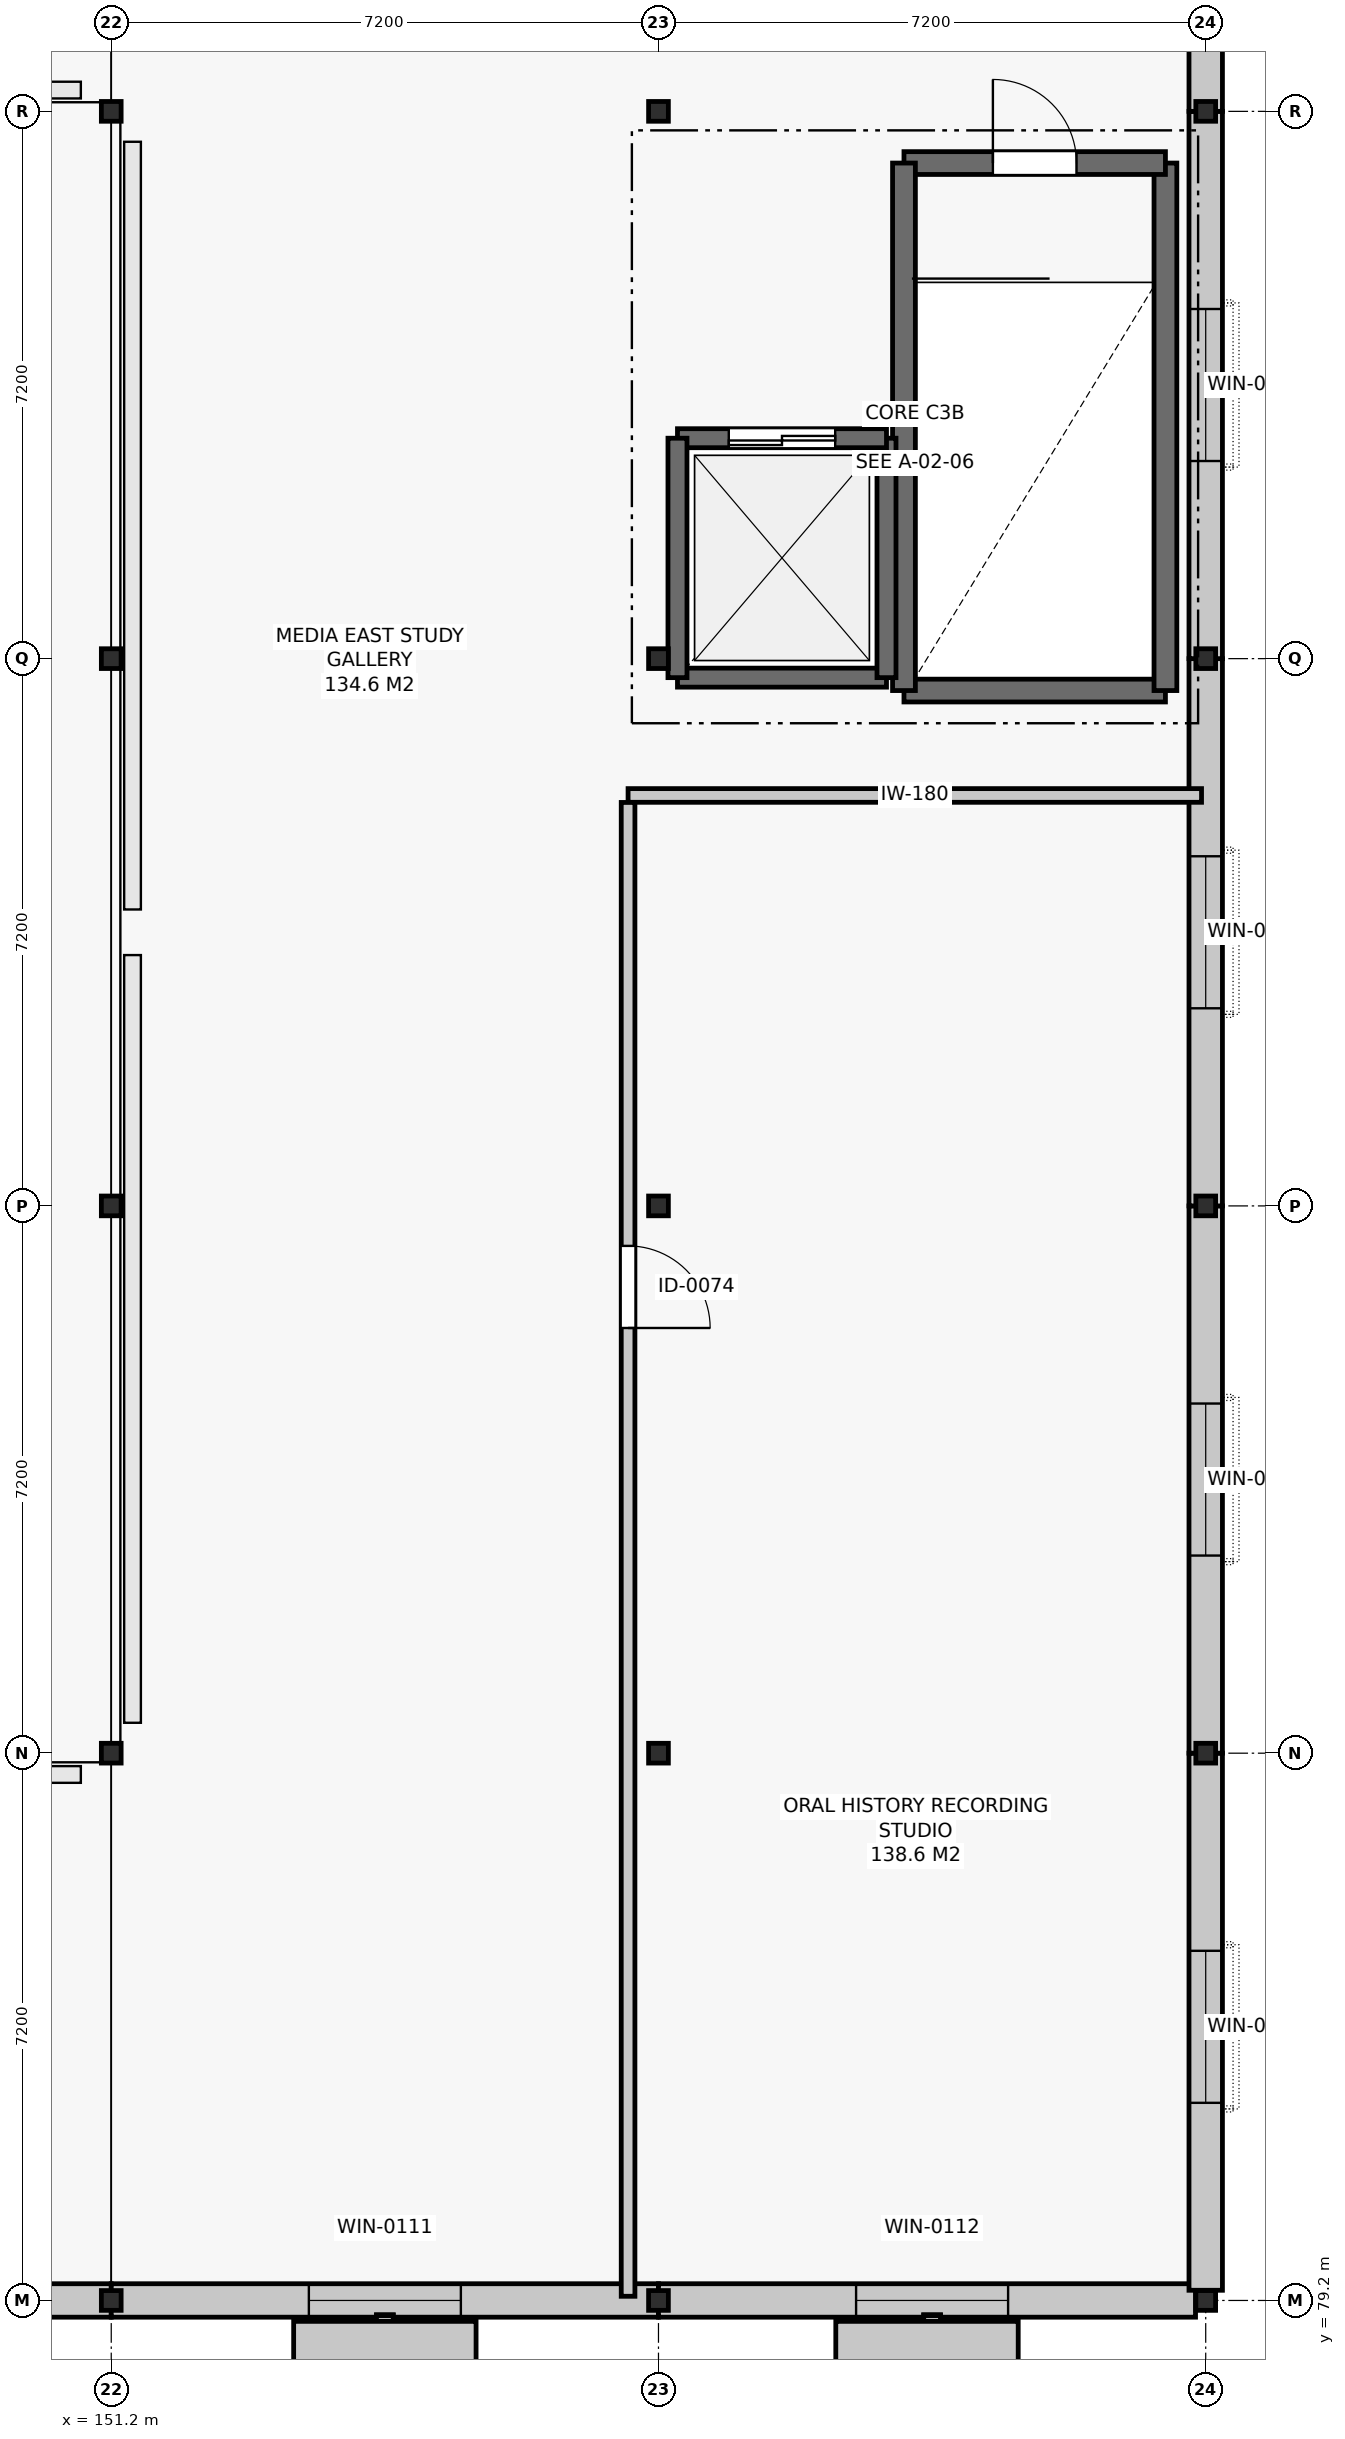
"""IFC4 building model, lengths in metres.
Left out: names, types, materials, properties, quantities, classifications, styles, units other than length and angle.
Written with IfcOpenShell. Run it as: python <this file> out.ifc"""

import sys

from ifc_helpers import new_model, si_unit, direction, frame, frame_2d, origin, origin_2d, place, context, subcontext, project, spatial, rectangle, i_section, extrude, element, fill, save


model = new_model("IFC4")
c1 = context("Model", 3, precision=1e-05, world=origin(), true_north=direction((0.0, 1.0)))
c2 = subcontext(c1, "Body", "Model", "MODEL_VIEW")
j1 = project(units=[si_unit("LENGTHUNIT", "METRE"), si_unit("PLANEANGLEUNIT", "RADIAN")], contexts=[c1])
p1 = place(None, origin())
s1 = spatial("IfcSite", under=j1, at=p1, CompositionType="ELEMENT")
p2 = place(p1, origin())
s2 = spatial("IfcBuilding", under=s1, at=p2, CompositionType="ELEMENT")
p3 = place(p2, frame((0.0, 0.0, 10.2)))
s3 = spatial("IfcBuildingStorey", under=s2, at=p3, CompositionType="ELEMENT", Elevation=10.2)
for number, where, z_axis, x_axis in (
    (1, (151.2, 79.2, 0.0), (0.0, 0.0, 1.0), (1.0, 0.0, 0.0)),
    (2, (151.2, 86.4, 0.0), (0.0, 0.0, 1.0), (1.0, 0.0, 0.0)),
    (3, (151.2, 93.6, 0.0), (0.0, 0.0, 1.0), (1.0, 0.0, 0.0)),
    (4, (151.2, 100.8, 0.0), (0.0, 0.0, 1.0), (1.0, 0.0, 0.0)),
    (5, (151.2, 108.0, 0.0), (0.0, 0.0, 1.0), (1.0, 0.0, 0.0)),
    (6, (158.4, 79.2, 0.0), (0.0, 0.0, 1.0), (1.0, 0.0, 0.0)),
    (7, (158.4, 86.4, 0.0), (0.0, 0.0, 1.0), (1.0, 0.0, 0.0)),
    (8, (158.4, 93.6, 0.0), (0.0, 0.0, 1.0), (1.0, 0.0, 0.0)),
    (9, (158.4, 100.8, 0.0), (0.0, 0.0, 1.0), (1.0, 0.0, 0.0)),
    (10, (158.4, 108.0, 0.0), (0.0, 0.0, 1.0), (1.0, 0.0, 0.0)),
    (11, (165.6, 79.2, 0.0), (0.0, 0.0, 1.0), (1.0, 0.0, 0.0)),
    (12, (165.6, 86.4, 0.0), (0.0, 0.0, 1.0), (1.0, 0.0, 0.0)),
    (13, (165.6, 93.6, 0.0), (0.0, 0.0, 1.0), (1.0, 0.0, 0.0)),
    (14, (165.6, 100.8, 0.0), (0.0, 0.0, 1.0), (1.0, 0.0, 0.0)),
    (15, (165.6, 108.0, 0.0), (0.0, 0.0, 1.0), (1.0, 0.0, 0.0)),
):
    element("IfcColumn", number, at=place(p3, frame(where, z_axis=z_axis, x_axis=x_axis)), inside=s3, PredefinedType="COLUMN", context=c2, shape_type="SweptSolid", body=[
        extrude(i_section(OverallWidth=0.26, OverallDepth=0.26, WebThickness=0.01, FlangeThickness=0.018, FilletRadius=0.024, at=origin_2d()), origin(), (0.0, 0.0, 1.0), 4.2),
    ])
p4 = place(p3, frame((144.0, 79.2, 0.0), z_axis=(0.0, 0.0, 1.0), x_axis=(1.0, 0.0, 0.0)))
e16 = element("IfcWall", 16, at=p4, inside=s3, PredefinedType="SOLIDWALL", context=c2, shape_type="SweptSolid", body=[
    extrude(rectangle(XDim=7.2, YDim=0.44, at=frame_2d((3.6, 0.0))), origin(), (0.0, 0.0, 1.0), 3.24),
])
p5 = place(p4, frame((2.6, 0.0, 1.35)))
e17 = element("IfcOpeningElement", 17, at=p5, cuts=e16, PredefinedType="OPENING", context=c2, shape_type="SweptSolid", body=[
    extrude(rectangle(XDim=2.0, YDim=1.5, at=frame_2d((1.0, 0.75))), frame((0.0, 0.232, 0.0), z_axis=(0.0, -1.0, 0.0), x_axis=(1.0, 0.0, 0.0)), (0.0, 0.0, 1.0), 0.464),
])
p6 = place(p3, frame((151.2, 79.2, 0.0), z_axis=(0.0, 0.0, 1.0), x_axis=(1.0, 0.0, 0.0)))
e18 = element("IfcWall", 18, at=p6, inside=s3, PredefinedType="SOLIDWALL", context=c2, shape_type="SweptSolid", body=[
    extrude(rectangle(XDim=7.2, YDim=0.44, at=frame_2d((3.6, 0.0))), origin(), (0.0, 0.0, 1.0), 3.24),
])
p7 = place(p6, frame((2.6, 0.0, 1.35)))
e19 = element("IfcOpeningElement", 19, at=p7, cuts=e18, PredefinedType="OPENING", context=c2, shape_type="SweptSolid", body=[
    extrude(rectangle(XDim=2.0, YDim=1.5, at=frame_2d((1.0, 0.75))), frame((0.0, 0.232, 0.0), z_axis=(0.0, -1.0, 0.0), x_axis=(1.0, 0.0, 0.0)), (0.0, 0.0, 1.0), 0.464),
])
p8 = place(p3, frame((158.4, 79.2, 0.0), z_axis=(0.0, 0.0, 1.0), x_axis=(1.0, 0.0, 0.0)))
e20 = element("IfcWall", 20, at=p8, inside=s3, PredefinedType="SOLIDWALL", context=c2, shape_type="SweptSolid", body=[
    extrude(rectangle(XDim=7.066, YDim=0.44, at=frame_2d((3.533, 0.0))), origin(), (0.0, 0.0, 1.0), 3.24),
])
p9 = place(p8, frame((2.6, 0.0, 1.35)))
e21 = element("IfcOpeningElement", 21, at=p9, cuts=e20, PredefinedType="OPENING", context=c2, shape_type="SweptSolid", body=[
    extrude(rectangle(XDim=2.0, YDim=1.5, at=frame_2d((1.0, 0.75))), frame((0.0, 0.232, 0.0), z_axis=(0.0, -1.0, 0.0), x_axis=(1.0, 0.0, 0.0)), (0.0, 0.0, 1.0), 0.464),
])
p10 = place(p3, frame((165.6, 79.334, 0.0), z_axis=(0.0, 0.0, 1.0), x_axis=(0.0, 1.0, 0.0)))
e22 = element("IfcWall", 22, at=p10, inside=s3, PredefinedType="SOLIDWALL", context=c2, shape_type="SweptSolid", body=[
    extrude(rectangle(XDim=7.066, YDim=0.44, at=frame_2d((3.533, 0.0))), origin(), (0.0, 0.0, 1.0), 3.24),
])
p11 = place(p10, frame((2.466, 0.0, 1.35)))
e23 = element("IfcOpeningElement", 23, at=p11, cuts=e22, PredefinedType="OPENING", context=c2, shape_type="SweptSolid", body=[
    extrude(rectangle(XDim=2.0, YDim=1.5, at=frame_2d((1.0, 0.75))), frame((0.0, 0.232, 0.0), z_axis=(0.0, -1.0, 0.0), x_axis=(1.0, 0.0, 0.0)), (0.0, 0.0, 1.0), 0.464),
])
p12 = place(p3, frame((165.6, 86.4, 0.0), z_axis=(0.0, 0.0, 1.0), x_axis=(0.0, 1.0, 0.0)))
e24 = element("IfcWall", 24, at=p12, inside=s3, PredefinedType="SOLIDWALL", context=c2, shape_type="SweptSolid", body=[
    extrude(rectangle(XDim=7.2, YDim=0.44, at=frame_2d((3.6, 0.0))), origin(), (0.0, 0.0, 1.0), 3.24),
])
p13 = place(p12, frame((2.6, 0.0, 1.35)))
e25 = element("IfcOpeningElement", 25, at=p13, cuts=e24, PredefinedType="OPENING", context=c2, shape_type="SweptSolid", body=[
    extrude(rectangle(XDim=2.0, YDim=1.5, at=frame_2d((1.0, 0.75))), frame((0.0, 0.232, 0.0), z_axis=(0.0, -1.0, 0.0), x_axis=(1.0, 0.0, 0.0)), (0.0, 0.0, 1.0), 0.464),
])
p14 = place(p3, frame((165.6, 93.6, 0.0), z_axis=(0.0, 0.0, 1.0), x_axis=(0.0, 1.0, 0.0)))
e26 = element("IfcWall", 26, at=p14, inside=s3, PredefinedType="SOLIDWALL", context=c2, shape_type="SweptSolid", body=[
    extrude(rectangle(XDim=7.2, YDim=0.44, at=frame_2d((3.6, 0.0))), origin(), (0.0, 0.0, 1.0), 3.24),
])
p15 = place(p14, frame((2.6, 0.0, 1.35)))
e27 = element("IfcOpeningElement", 27, at=p15, cuts=e26, PredefinedType="OPENING", context=c2, shape_type="SweptSolid", body=[
    extrude(rectangle(XDim=2.0, YDim=1.5, at=frame_2d((1.0, 0.75))), frame((0.0, 0.232, 0.0), z_axis=(0.0, -1.0, 0.0), x_axis=(1.0, 0.0, 0.0)), (0.0, 0.0, 1.0), 0.464),
])
p16 = place(p3, frame((165.6, 100.8, 0.0), z_axis=(0.0, 0.0, 1.0), x_axis=(0.0, 1.0, 0.0)))
e28 = element("IfcWall", 28, at=p16, inside=s3, PredefinedType="SOLIDWALL", context=c2, shape_type="SweptSolid", body=[
    extrude(rectangle(XDim=7.2, YDim=0.44, at=frame_2d((3.6, 0.0))), origin(), (0.0, 0.0, 1.0), 3.24),
])
p17 = place(p16, frame((2.6, 0.0, 1.35)))
e29 = element("IfcOpeningElement", 29, at=p17, cuts=e28, PredefinedType="OPENING", context=c2, shape_type="SweptSolid", body=[
    extrude(rectangle(XDim=2.0, YDim=1.5, at=frame_2d((1.0, 0.75))), frame((0.0, 0.232, 0.0), z_axis=(0.0, -1.0, 0.0), x_axis=(1.0, 0.0, 0.0)), (0.0, 0.0, 1.0), 0.464),
])
p18 = place(p3, frame((165.6, 108.0, 0.0), z_axis=(0.0, 0.0, 1.0), x_axis=(0.0, 1.0, 0.0)))
e30 = element("IfcWall", 30, at=p18, inside=s3, PredefinedType="SOLIDWALL", context=c2, shape_type="SweptSolid", body=[
    extrude(rectangle(XDim=7.066, YDim=0.44, at=frame_2d((3.533, 0.0))), origin(), (0.0, 0.0, 1.0), 3.24),
])
p19 = place(p18, frame((2.6, 0.0, 1.35)))
e31 = element("IfcOpeningElement", 31, at=p19, cuts=e30, PredefinedType="OPENING", context=c2, shape_type="SweptSolid", body=[
    extrude(rectangle(XDim=2.0, YDim=1.5, at=frame_2d((1.0, 0.75))), frame((0.0, 0.232, 0.0), z_axis=(0.0, -1.0, 0.0), x_axis=(1.0, 0.0, 0.0)), (0.0, 0.0, 1.0), 0.464),
])
p20 = place(p3, frame((161.63, 100.38, 0.0), z_axis=(0.0, 0.0, 1.0), x_axis=(1.0, 0.0, 0.0)))
e32 = element("IfcWall", 32, at=p20, inside=s3, PredefinedType="SHEAR", context=c2, shape_type="SweptSolid", body=[
    extrude(rectangle(XDim=3.44, YDim=0.3, at=frame_2d((1.72, 0.0))), origin(), (0.0, 0.0, 1.0), 3.96),
])
p21 = place(p3, frame((165.07, 100.38, 0.0), z_axis=(0.0, 0.0, 1.0), x_axis=(0.0, 1.0, 0.0)))
e33 = element("IfcWall", 33, at=p21, inside=s3, PredefinedType="SHEAR", context=c2, shape_type="SweptSolid", body=[
    extrude(rectangle(XDim=6.94, YDim=0.3, at=frame_2d((3.47, 0.0))), origin(), (0.0, 0.0, 1.0), 3.96),
])
p22 = place(p3, frame((165.07, 107.32, 0.0), z_axis=(0.0, 0.0, 1.0), x_axis=(-1.0, 0.0, 0.0)))
e34 = element("IfcWall", 34, at=p22, inside=s3, PredefinedType="SHEAR", context=c2, shape_type="SweptSolid", body=[
    extrude(rectangle(XDim=3.44, YDim=0.3, at=frame_2d((1.72, 0.0))), origin(), (0.0, 0.0, 1.0), 3.96),
])
p23 = place(p22, frame((1.17, 0.0, 0.0)))
e35 = element("IfcOpeningElement", 35, at=p23, cuts=e34, PredefinedType="OPENING", context=c2, shape_type="SweptSolid", body=[
    extrude(rectangle(XDim=1.1, YDim=2.15, at=frame_2d((0.55, 1.075))), frame((0.0, 0.162, 0.0), z_axis=(0.0, -1.0, 0.0), x_axis=(1.0, 0.0, 0.0)), (0.0, 0.0, 1.0), 0.324),
])
p24 = place(p3, frame((161.63, 107.32, 0.0), z_axis=(0.0, 0.0, 1.0), x_axis=(0.0, -1.0, 0.0)))
e36 = element("IfcWall", 36, at=p24, inside=s3, PredefinedType="SHEAR", context=c2, shape_type="SweptSolid", body=[
    extrude(rectangle(XDim=6.94, YDim=0.3, at=frame_2d((3.47, 0.0))), origin(), (0.0, 0.0, 1.0), 3.96),
])
p25 = place(p3, frame((158.65, 100.55, 0.0), z_axis=(0.0, 0.0, 1.0), x_axis=(1.0, 0.0, 0.0)))
e37 = element("IfcWall", 37, at=p25, inside=s3, PredefinedType="SHEAR", context=c2, shape_type="SweptSolid", body=[
    extrude(rectangle(XDim=2.75, YDim=0.25, at=frame_2d((1.375, 0.0))), origin(), (0.0, 0.0, 1.0), 3.96),
])
p26 = place(p3, frame((161.4, 100.55, 0.0), z_axis=(0.0, 0.0, 1.0), x_axis=(0.0, 1.0, 0.0)))
e38 = element("IfcWall", 38, at=p26, inside=s3, PredefinedType="SHEAR", context=c2, shape_type="SweptSolid", body=[
    extrude(rectangle(XDim=3.15, YDim=0.25, at=frame_2d((1.575, 0.0))), origin(), (0.0, 0.0, 1.0), 3.96),
])
p27 = place(p3, frame((161.4, 103.7, 0.0), z_axis=(0.0, 0.0, 1.0), x_axis=(-1.0, 0.0, 0.0)))
e39 = element("IfcWall", 39, at=p27, inside=s3, PredefinedType="SHEAR", context=c2, shape_type="SweptSolid", body=[
    extrude(rectangle(XDim=2.75, YDim=0.25, at=frame_2d((1.375, 0.0))), origin(), (0.0, 0.0, 1.0), 3.96),
])
p28 = place(p27, frame((0.675, 0.0, 0.0)))
e40 = element("IfcOpeningElement", 40, at=p28, cuts=e39, PredefinedType="OPENING", context=c2, shape_type="SweptSolid", body=[
    extrude(rectangle(XDim=1.4, YDim=2.2, at=frame_2d((0.7, 1.1))), frame((0.0, 0.137, 0.0), z_axis=(0.0, -1.0, 0.0), x_axis=(1.0, 0.0, 0.0)), (0.0, 0.0, 1.0), 0.274),
])
p29 = place(p3, frame((158.65, 103.7, 0.0), z_axis=(0.0, 0.0, 1.0), x_axis=(0.0, -1.0, 0.0)))
e41 = element("IfcWall", 41, at=p29, inside=s3, PredefinedType="SHEAR", context=c2, shape_type="SweptSolid", body=[
    extrude(rectangle(XDim=3.15, YDim=0.25, at=frame_2d((1.575, 0.0))), origin(), (0.0, 0.0, 1.0), 3.96),
])
p30 = place(p3, frame((158.0, 99.0, 0.0), z_axis=(0.0, 0.0, 1.0), x_axis=(1.0, 0.0, 0.0)))
e42 = element("IfcWall", 42, at=p30, inside=s3, PredefinedType="PARTITIONING", context=c2, shape_type="SweptSolid", body=[
    extrude(rectangle(XDim=7.545, YDim=0.18, at=frame_2d((3.772, 0.0))), origin(), (0.0, 0.0, 1.0), 3.245),
])
p31 = place(p3, frame((158.0, 79.255, 0.0), z_axis=(0.0, 0.0, 1.0), x_axis=(0.0, 1.0, 0.0)))
e43 = element("IfcWall", 43, at=p31, inside=s3, PredefinedType="PARTITIONING", context=c2, shape_type="SweptSolid", body=[
    extrude(rectangle(XDim=19.653, YDim=0.18, at=frame_2d((9.827, 0.0))), origin(), (0.0, 0.0, 1.0), 3.395),
])
p32 = place(p31, frame((12.739, 0.0, 0.0)))
e44 = element("IfcOpeningElement", 44, at=p32, cuts=e43, PredefinedType="OPENING", context=c2, shape_type="SweptSolid", body=[
    extrude(rectangle(XDim=1.08, YDim=2.2, at=frame_2d((0.54, 1.1))), frame((0.0, 0.102, 0.0), z_axis=(0.0, -1.0, 0.0), x_axis=(1.0, 0.0, 0.0)), (0.0, 0.0, 1.0), 0.204),
])
p33 = place(p7, origin())
e45 = element("IfcWindow", 45, at=p33, inside=s3, PartitioningType="SINGLE_PANEL", PredefinedType="WINDOW", context=c2, shape_type="SweptSolid", body=[
    extrude(rectangle(XDim=2.0, YDim=1.5, at=frame_2d((1.0, 0.75))), frame((0.0, 0.03, 0.0), z_axis=(0.0, -1.0, 0.0), x_axis=(1.0, 0.0, 0.0)), (0.0, 0.0, 1.0), 0.06),
])
fill(e19, e45)
p34 = place(p9, origin())
e46 = element("IfcWindow", 46, at=p34, inside=s3, PartitioningType="SINGLE_PANEL", PredefinedType="WINDOW", context=c2, shape_type="SweptSolid", body=[
    extrude(rectangle(XDim=2.0, YDim=1.5, at=frame_2d((1.0, 0.75))), frame((0.0, 0.03, 0.0), z_axis=(0.0, -1.0, 0.0), x_axis=(1.0, 0.0, 0.0)), (0.0, 0.0, 1.0), 0.06),
])
fill(e21, e46)
p35 = place(p11, origin())
e47 = element("IfcWindow", 47, at=p35, inside=s3, PartitioningType="SINGLE_PANEL", PredefinedType="WINDOW", context=c2, shape_type="SweptSolid", body=[
    extrude(rectangle(XDim=2.0, YDim=1.5, at=frame_2d((1.0, 0.75))), frame((0.0, 0.03, 0.0), z_axis=(0.0, -1.0, 0.0), x_axis=(1.0, 0.0, 0.0)), (0.0, 0.0, 1.0), 0.06),
])
fill(e23, e47)
p36 = place(p13, origin())
e48 = element("IfcWindow", 48, at=p36, inside=s3, PartitioningType="SINGLE_PANEL", PredefinedType="WINDOW", context=c2, shape_type="SweptSolid", body=[
    extrude(rectangle(XDim=2.0, YDim=1.5, at=frame_2d((1.0, 0.75))), frame((0.0, 0.03, 0.0), z_axis=(0.0, -1.0, 0.0), x_axis=(1.0, 0.0, 0.0)), (0.0, 0.0, 1.0), 0.06),
])
fill(e25, e48)
p37 = place(p15, origin())
e49 = element("IfcWindow", 49, at=p37, inside=s3, PartitioningType="SINGLE_PANEL", PredefinedType="WINDOW", context=c2, shape_type="SweptSolid", body=[
    extrude(rectangle(XDim=2.0, YDim=1.5, at=frame_2d((1.0, 0.75))), frame((0.0, 0.03, 0.0), z_axis=(0.0, -1.0, 0.0), x_axis=(1.0, 0.0, 0.0)), (0.0, 0.0, 1.0), 0.06),
])
fill(e27, e49)
p38 = place(p17, origin())
e50 = element("IfcWindow", 50, at=p38, inside=s3, PartitioningType="SINGLE_PANEL", PredefinedType="WINDOW", context=c2, shape_type="SweptSolid", body=[
    extrude(rectangle(XDim=2.0, YDim=1.5, at=frame_2d((1.0, 0.75))), frame((0.0, 0.03, 0.0), z_axis=(0.0, -1.0, 0.0), x_axis=(1.0, 0.0, 0.0)), (0.0, 0.0, 1.0), 0.06),
])
fill(e29, e50)
p39 = place(p23, frame((1.1, 0.0, 0.0), z_axis=(0.0, 0.0, 1.0), x_axis=(-1.0, 0.0, 0.0)))
e51 = element("IfcDoor", 51, at=p39, inside=s3, OperationType="SINGLE_SWING_LEFT", PredefinedType="DOOR", context=c2, shape_type="SweptSolid", body=[
    extrude(rectangle(XDim=1.1, YDim=2.15, at=frame_2d((0.55, 1.075))), frame((0.0, 0.025, 0.0), z_axis=(0.0, -1.0, 0.0), x_axis=(1.0, 0.0, 0.0)), (0.0, 0.0, 1.0), 0.05),
])
fill(e35, e51)
p40 = place(p28, origin())
e52 = element("IfcDoor", 52, at=p40, inside=s3, OperationType="DOUBLE_DOOR_SLIDING", PredefinedType="DOOR", context=c2, shape_type="SweptSolid", body=[
    extrude(rectangle(XDim=1.4, YDim=2.2, at=frame_2d((0.7, 1.1))), frame((0.0, 0.025, 0.0), z_axis=(0.0, -1.0, 0.0), x_axis=(1.0, 0.0, 0.0)), (0.0, 0.0, 1.0), 0.05),
])
fill(e40, e52)
p41 = place(p32, frame((1.08, 0.0, 0.0), z_axis=(0.0, 0.0, 1.0), x_axis=(-1.0, 0.0, 0.0)))
e53 = element("IfcDoor", 53, at=p41, inside=s3, OperationType="SINGLE_SWING_RIGHT", PredefinedType="DOOR", context=c2, shape_type="SweptSolid", body=[
    extrude(rectangle(XDim=1.08, YDim=2.2, at=frame_2d((0.54, 1.1))), frame((0.0, 0.025, 0.0), z_axis=(0.0, -1.0, 0.0), x_axis=(1.0, 0.0, 0.0)), (0.0, 0.0, 1.0), 0.05),
])
fill(e44, e53)
save(model, sys.argv[1])
